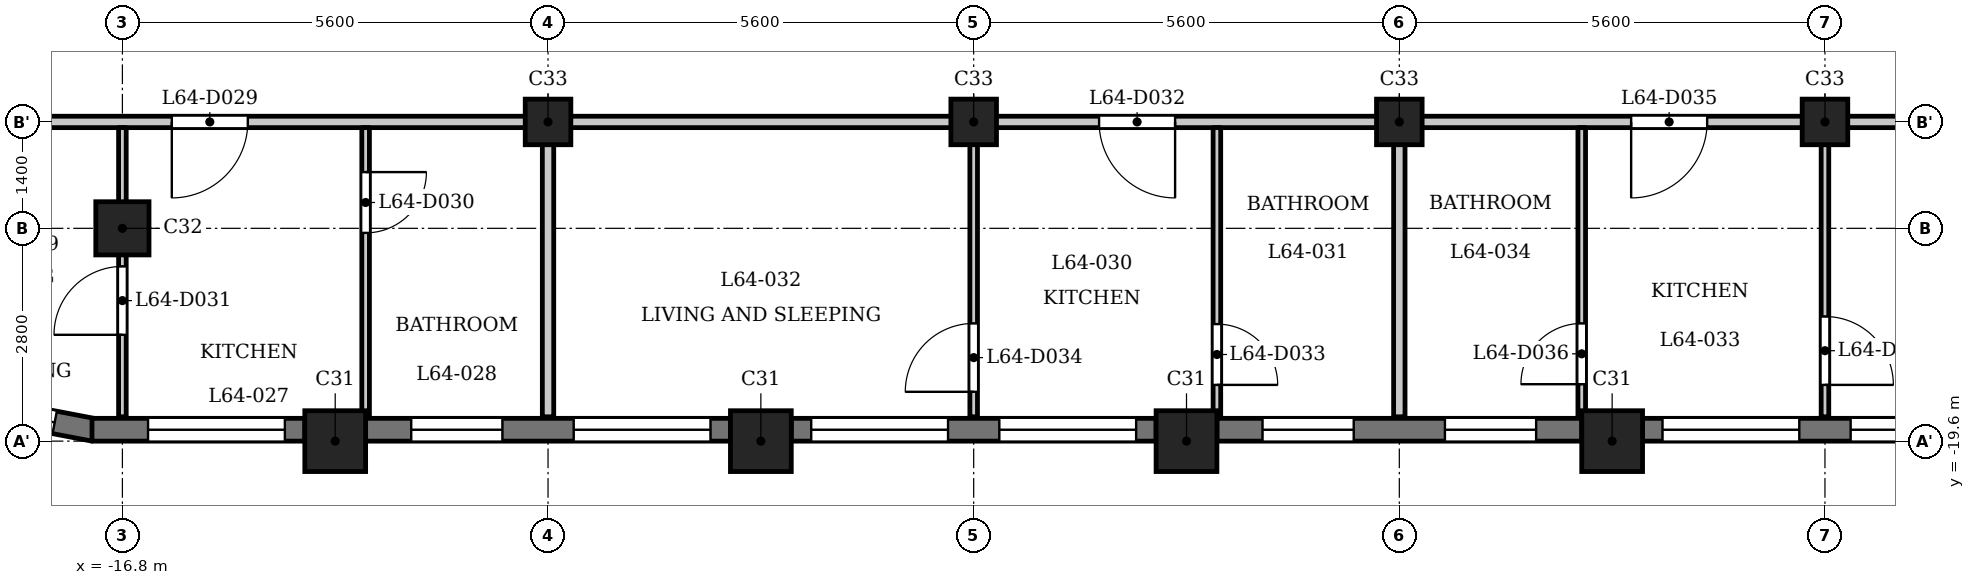
"""IFC4 building model, lengths in metres.
Left out: names, types, materials, properties, quantities, classifications, styles, units other than length and angle.
Written with IfcOpenShell. Run it as: python <this file> out.ifc"""

import sys

from ifc_helpers import new_model, si_unit, direction, frame, frame_2d, origin, origin_2d, place, context, subcontext, project, spatial, rectangle, extrude, element, fill, save


model = new_model("IFC4")
c1 = context("Model", 3, precision=1e-05, world=origin(), true_north=direction((0.0, 1.0)))
c2 = subcontext(c1, "Body", "Model", "MODEL_VIEW")
j1 = project(units=[si_unit("LENGTHUNIT", "METRE"), si_unit("PLANEANGLEUNIT", "RADIAN")], contexts=[c1])
p1 = place(None, origin())
s1 = spatial("IfcSite", under=j1, at=p1, CompositionType="ELEMENT")
p2 = place(p1, origin())
s2 = spatial("IfcBuilding", under=s1, at=p2, CompositionType="ELEMENT")
p3 = place(p2, frame((0.0, 0.0, 248.7)))
s3 = spatial("IfcBuildingStorey", under=s2, at=p3, CompositionType="ELEMENT", Elevation=248.7)
for number, where, z_axis, x_axis in (
    (1, (-14.0, -19.6, 0.0), (0.0, 0.0, 1.0), (1.0, 0.0, 0.0)),
    (2, (-8.4, -19.6, 0.0), (0.0, 0.0, 1.0), (1.0, 0.0, 0.0)),
    (3, (-2.8, -19.6, 0.0), (0.0, 0.0, 1.0), (1.0, 0.0, 0.0)),
    (4, (2.8, -19.6, 0.0), (0.0, 0.0, 1.0), (1.0, 0.0, 0.0)),
):
    element("IfcColumn", number, at=place(p3, frame(where, z_axis=z_axis, x_axis=x_axis)), inside=s3, PredefinedType="COLUMN", context=c2, shape_type="SweptSolid", body=[
        extrude(rectangle(XDim=0.8, YDim=0.8, at=origin_2d()), origin(), (0.0, 0.0, 1.0), 3.5),
    ])
p4 = place(p3, frame((-16.8, -16.8, 0.0), z_axis=(0.0, 0.0, 1.0), x_axis=(1.0, 0.0, 0.0)))
e5 = element("IfcColumn", 5, at=p4, inside=s3, PredefinedType="COLUMN", context=c2, shape_type="SweptSolid", body=[
    extrude(rectangle(XDim=0.7, YDim=0.7, at=origin_2d()), origin(), (0.0, 0.0, 1.0), 3.5),
])
for number, where, z_axis, x_axis in (
    (6, (-11.2, -15.4, 0.0), (0.0, 0.0, 1.0), (1.0, 0.0, 0.0)),
    (7, (-5.6, -15.4, 0.0), (0.0, 0.0, 1.0), (1.0, 0.0, 0.0)),
    (8, (0.0, -15.4, 0.0), (0.0, 0.0, 1.0), (1.0, 0.0, 0.0)),
    (9, (5.6, -15.4, 0.0), (0.0, 0.0, 1.0), (1.0, 0.0, 0.0)),
):
    element("IfcColumn", number, at=place(p3, frame(where, z_axis=z_axis, x_axis=x_axis)), inside=s3, PredefinedType="COLUMN", context=c2, shape_type="SweptSolid", body=[
        extrude(rectangle(XDim=0.6, YDim=0.6, at=origin_2d()), origin(), (0.0, 0.0, 1.0), 3.5),
    ])
p5 = place(p3, frame((-18.995, -19.105, 0.0), z_axis=(0.0, 0.0, 1.0), x_axis=(0.982301706131, -0.187305520826, 0.0)))
e10 = element("IfcWall", 10, at=p5, inside=s3, PredefinedType="SOLIDWALL", context=c2, shape_type="SweptSolid", body=[
    extrude(rectangle(XDim=1.856, YDim=0.3, at=frame_2d((0.928, 0.0))), origin(), (0.0, 0.0, 1.0), 2.55),
])
p6 = place(p5, frame((0.528, 0.0, 0.6)))
e11 = element("IfcOpeningElement", 11, at=p6, cuts=e10, PredefinedType="OPENING", context=c2, shape_type="SweptSolid", body=[
    extrude(rectangle(XDim=0.8, YDim=1.55, at=frame_2d((0.4, 0.775))), frame((0.0, 0.16, 0.0), z_axis=(0.0, -1.0, 0.0), x_axis=(1.0, 0.0, 0.0)), (0.0, 0.0, 1.0), 0.32),
])
p7 = place(p3, frame((-17.2, -19.45, 0.0), z_axis=(0.0, 0.0, 1.0), x_axis=(1.0, 0.0, 0.0)))
e12 = element("IfcWall", 12, at=p7, inside=s3, PredefinedType="SOLIDWALL", context=c2, shape_type="SweptSolid", body=[
    extrude(rectangle(XDim=2.8, YDim=0.3, at=frame_2d((1.4, 0.0))), origin(), (0.0, 0.0, 1.0), 2.55),
])
p8 = place(p7, frame((0.738, 0.0, 0.9)))
e13 = element("IfcOpeningElement", 13, at=p8, cuts=e12, PredefinedType="OPENING", context=c2, shape_type="SweptSolid", body=[
    extrude(rectangle(XDim=1.8, YDim=1.25, at=frame_2d((0.9, 0.625))), frame((0.0, 0.16, 0.0), z_axis=(0.0, -1.0, 0.0), x_axis=(1.0, 0.0, 0.0)), (0.0, 0.0, 1.0), 0.32),
])
p9 = place(p3, frame((-13.6, -19.45, 0.0), z_axis=(0.0, 0.0, 1.0), x_axis=(1.0, 0.0, 0.0)))
e14 = element("IfcWall", 14, at=p9, inside=s3, PredefinedType="SOLIDWALL", context=c2, shape_type="SweptSolid", body=[
    extrude(rectangle(XDim=4.8, YDim=0.3, at=frame_2d((2.4, 0.0))), origin(), (0.0, 0.0, 1.0), 2.55),
])
p10 = place(p9, frame((0.6, 0.0, 0.6)))
e15 = element("IfcOpeningElement", 15, at=p10, cuts=e14, PredefinedType="OPENING", context=c2, shape_type="SweptSolid", body=[
    extrude(rectangle(XDim=1.2, YDim=1.55, at=frame_2d((0.6, 0.775))), frame((0.0, 0.16, 0.0), z_axis=(0.0, -1.0, 0.0), x_axis=(1.0, 0.0, 0.0)), (0.0, 0.0, 1.0), 0.32),
])
p11 = place(p9, frame((2.738, 0.0, 0.9)))
e16 = element("IfcOpeningElement", 16, at=p11, cuts=e14, PredefinedType="OPENING", context=c2, shape_type="SweptSolid", body=[
    extrude(rectangle(XDim=1.8, YDim=1.25, at=frame_2d((0.9, 0.625))), frame((0.0, 0.16, 0.0), z_axis=(0.0, -1.0, 0.0), x_axis=(1.0, 0.0, 0.0)), (0.0, 0.0, 1.0), 0.32),
])
p12 = place(p3, frame((-8.0, -19.45, 0.0), z_axis=(0.0, 0.0, 1.0), x_axis=(1.0, 0.0, 0.0)))
e17 = element("IfcWall", 17, at=p12, inside=s3, PredefinedType="SOLIDWALL", context=c2, shape_type="SweptSolid", body=[
    extrude(rectangle(XDim=4.8, YDim=0.3, at=frame_2d((2.4, 0.0))), origin(), (0.0, 0.0, 1.0), 2.55),
])
p13 = place(p12, frame((0.262, 0.0, 0.9)))
e18 = element("IfcOpeningElement", 18, at=p13, cuts=e17, PredefinedType="OPENING", context=c2, shape_type="SweptSolid", body=[
    extrude(rectangle(XDim=1.8, YDim=1.25, at=frame_2d((0.9, 0.625))), frame((0.0, 0.16, 0.0), z_axis=(0.0, -1.0, 0.0), x_axis=(1.0, 0.0, 0.0)), (0.0, 0.0, 1.0), 0.32),
])
p14 = place(p12, frame((2.738, 0.0, 0.9)))
e19 = element("IfcOpeningElement", 19, at=p14, cuts=e17, PredefinedType="OPENING", context=c2, shape_type="SweptSolid", body=[
    extrude(rectangle(XDim=1.8, YDim=1.25, at=frame_2d((0.9, 0.625))), frame((0.0, 0.16, 0.0), z_axis=(0.0, -1.0, 0.0), x_axis=(1.0, 0.0, 0.0)), (0.0, 0.0, 1.0), 0.32),
])
p15 = place(p3, frame((-2.4, -19.45, 0.0), z_axis=(0.0, 0.0, 1.0), x_axis=(1.0, 0.0, 0.0)))
e20 = element("IfcWall", 20, at=p15, inside=s3, PredefinedType="SOLIDWALL", context=c2, shape_type="SweptSolid", body=[
    extrude(rectangle(XDim=4.8, YDim=0.3, at=frame_2d((2.4, 0.0))), origin(), (0.0, 0.0, 1.0), 2.55),
])
p16 = place(p15, frame((0.6, 0.0, 0.6)))
e21 = element("IfcOpeningElement", 21, at=p16, cuts=e20, PredefinedType="OPENING", context=c2, shape_type="SweptSolid", body=[
    extrude(rectangle(XDim=1.2, YDim=1.55, at=frame_2d((0.6, 0.775))), frame((0.0, 0.16, 0.0), z_axis=(0.0, -1.0, 0.0), x_axis=(1.0, 0.0, 0.0)), (0.0, 0.0, 1.0), 0.32),
])
p17 = place(p15, frame((3.0, 0.0, 0.6)))
e22 = element("IfcOpeningElement", 22, at=p17, cuts=e20, PredefinedType="OPENING", context=c2, shape_type="SweptSolid", body=[
    extrude(rectangle(XDim=1.2, YDim=1.55, at=frame_2d((0.6, 0.775))), frame((0.0, 0.16, 0.0), z_axis=(0.0, -1.0, 0.0), x_axis=(1.0, 0.0, 0.0)), (0.0, 0.0, 1.0), 0.32),
])
p18 = place(p3, frame((3.2, -19.45, 0.0), z_axis=(0.0, 0.0, 1.0), x_axis=(1.0, 0.0, 0.0)))
e23 = element("IfcWall", 23, at=p18, inside=s3, PredefinedType="SOLIDWALL", context=c2, shape_type="SweptSolid", body=[
    extrude(rectangle(XDim=4.8, YDim=0.3, at=frame_2d((2.4, 0.0))), origin(), (0.0, 0.0, 1.0), 2.55),
])
p19 = place(p18, frame((0.262, 0.0, 0.9)))
e24 = element("IfcOpeningElement", 24, at=p19, cuts=e23, PredefinedType="OPENING", context=c2, shape_type="SweptSolid", body=[
    extrude(rectangle(XDim=1.8, YDim=1.25, at=frame_2d((0.9, 0.625))), frame((0.0, 0.16, 0.0), z_axis=(0.0, -1.0, 0.0), x_axis=(1.0, 0.0, 0.0)), (0.0, 0.0, 1.0), 0.32),
])
p20 = place(p18, frame((2.738, 0.0, 0.9)))
e25 = element("IfcOpeningElement", 25, at=p20, cuts=e23, PredefinedType="OPENING", context=c2, shape_type="SweptSolid", body=[
    extrude(rectangle(XDim=1.8, YDim=1.25, at=frame_2d((0.9, 0.625))), frame((0.0, 0.16, 0.0), z_axis=(0.0, -1.0, 0.0), x_axis=(1.0, 0.0, 0.0)), (0.0, 0.0, 1.0), 0.32),
])
p21 = place(p3, frame((-23.322, -15.4, 0.0), z_axis=(0.0, 0.0, 1.0), x_axis=(1.0, 0.0, 0.0)))
e26 = element("IfcWall", 26, at=p21, inside=s3, PredefinedType="PARTITIONING", context=c2, shape_type="SweptSolid", body=[
    extrude(rectangle(XDim=46.872, YDim=0.15, at=frame_2d((23.436, 0.0))), origin(), (0.0, 0.0, 1.0), 3.2),
])
p22 = place(p21, frame((7.172, 0.0, 0.0)))
e27 = element("IfcOpeningElement", 27, at=p22, cuts=e26, PredefinedType="OPENING", context=c2, shape_type="SweptSolid", body=[
    extrude(rectangle(XDim=1.0, YDim=2.1, at=frame_2d((0.5, 1.05))), frame((0.0, 0.085, 0.0), z_axis=(0.0, -1.0, 0.0), x_axis=(1.0, 0.0, 0.0)), (0.0, 0.0, 1.0), 0.17),
])
p23 = place(p21, frame((19.372, 0.0, 0.0)))
e28 = element("IfcOpeningElement", 28, at=p23, cuts=e26, PredefinedType="OPENING", context=c2, shape_type="SweptSolid", body=[
    extrude(rectangle(XDim=1.0, YDim=2.1, at=frame_2d((0.5, 1.05))), frame((0.0, 0.085, 0.0), z_axis=(0.0, -1.0, 0.0), x_axis=(1.0, 0.0, 0.0)), (0.0, 0.0, 1.0), 0.17),
])
p24 = place(p21, frame((26.372, 0.0, 0.0)))
e29 = element("IfcOpeningElement", 29, at=p24, cuts=e26, PredefinedType="OPENING", context=c2, shape_type="SweptSolid", body=[
    extrude(rectangle(XDim=1.0, YDim=2.1, at=frame_2d((0.5, 1.05))), frame((0.0, 0.085, 0.0), z_axis=(0.0, -1.0, 0.0), x_axis=(1.0, 0.0, 0.0)), (0.0, 0.0, 1.0), 0.17),
])
p25 = place(p21, frame((38.572, 0.0, 0.0)))
e30 = element("IfcOpeningElement", 30, at=p25, cuts=e26, PredefinedType="OPENING", context=c2, shape_type="SweptSolid", body=[
    extrude(rectangle(XDim=1.0, YDim=2.1, at=frame_2d((0.5, 1.05))), frame((0.0, 0.085, 0.0), z_axis=(0.0, -1.0, 0.0), x_axis=(1.0, 0.0, 0.0)), (0.0, 0.0, 1.0), 0.17),
])
p26 = place(p3, frame((-16.8, -19.28, 0.0), z_axis=(0.0, 0.0, 1.0), x_axis=(0.0, 1.0, 0.0)))
e31 = element("IfcWall", 31, at=p26, inside=s3, PredefinedType="PARTITIONING", context=c2, shape_type="SweptSolid", body=[
    extrude(rectangle(XDim=3.805, YDim=0.1, at=frame_2d((1.902, 0.0))), origin(), (0.0, 0.0, 1.0), 3.2),
])
p27 = place(p26, frame((1.079, 0.0, 0.0)))
e32 = element("IfcOpeningElement", 32, at=p27, cuts=e31, PredefinedType="OPENING", context=c2, shape_type="SweptSolid", body=[
    extrude(rectangle(XDim=0.9, YDim=2.1, at=frame_2d((0.45, 1.05))), frame((0.0, 0.06, 0.0), z_axis=(0.0, -1.0, 0.0), x_axis=(1.0, 0.0, 0.0)), (0.0, 0.0, 1.0), 0.12),
])
p28 = place(p3, frame((-13.6, -19.28, 0.0), z_axis=(0.0, 0.0, 1.0), x_axis=(0.0, 1.0, 0.0)))
e33 = element("IfcWall", 33, at=p28, inside=s3, PredefinedType="PARTITIONING", context=c2, shape_type="SweptSolid", body=[
    extrude(rectangle(XDim=3.805, YDim=0.1, at=frame_2d((1.902, 0.0))), origin(), (0.0, 0.0, 1.0), 3.2),
])
p29 = place(p28, frame((2.42, 0.0, 0.0)))
e34 = element("IfcOpeningElement", 34, at=p29, cuts=e33, PredefinedType="OPENING", context=c2, shape_type="SweptSolid", body=[
    extrude(rectangle(XDim=0.8, YDim=2.1, at=frame_2d((0.4, 1.05))), frame((0.0, 0.06, 0.0), z_axis=(0.0, -1.0, 0.0), x_axis=(1.0, 0.0, 0.0)), (0.0, 0.0, 1.0), 0.12),
])
p30 = place(p3, frame((-11.2, -19.28, 0.0), z_axis=(0.0, 0.0, 1.0), x_axis=(0.0, 1.0, 0.0)))
e35 = element("IfcWall", 35, at=p30, inside=s3, PredefinedType="PARTITIONING", context=c2, shape_type="SweptSolid", body=[
    extrude(rectangle(XDim=3.805, YDim=0.15, at=frame_2d((1.902, 0.0))), origin(), (0.0, 0.0, 1.0), 3.2),
])
p31 = place(p3, frame((-5.6, -19.28, 0.0), z_axis=(0.0, 0.0, 1.0), x_axis=(0.0, 1.0, 0.0)))
e36 = element("IfcWall", 36, at=p31, inside=s3, PredefinedType="PARTITIONING", context=c2, shape_type="SweptSolid", body=[
    extrude(rectangle(XDim=3.805, YDim=0.1, at=frame_2d((1.902, 0.0))), origin(), (0.0, 0.0, 1.0), 3.2),
])
p32 = place(p31, frame((0.329, 0.0, 0.0)))
e37 = element("IfcOpeningElement", 37, at=p32, cuts=e36, PredefinedType="OPENING", context=c2, shape_type="SweptSolid", body=[
    extrude(rectangle(XDim=0.9, YDim=2.1, at=frame_2d((0.45, 1.05))), frame((0.0, 0.06, 0.0), z_axis=(0.0, -1.0, 0.0), x_axis=(1.0, 0.0, 0.0)), (0.0, 0.0, 1.0), 0.12),
])
p33 = place(p3, frame((-2.4, -19.28, 0.0), z_axis=(0.0, 0.0, 1.0), x_axis=(0.0, 1.0, 0.0)))
e38 = element("IfcWall", 38, at=p33, inside=s3, PredefinedType="PARTITIONING", context=c2, shape_type="SweptSolid", body=[
    extrude(rectangle(XDim=3.805, YDim=0.1, at=frame_2d((1.902, 0.0))), origin(), (0.0, 0.0, 1.0), 3.2),
])
p34 = place(p33, frame((0.42, 0.0, 0.0)))
e39 = element("IfcOpeningElement", 39, at=p34, cuts=e38, PredefinedType="OPENING", context=c2, shape_type="SweptSolid", body=[
    extrude(rectangle(XDim=0.8, YDim=2.1, at=frame_2d((0.4, 1.05))), frame((0.0, 0.06, 0.0), z_axis=(0.0, -1.0, 0.0), x_axis=(1.0, 0.0, 0.0)), (0.0, 0.0, 1.0), 0.12),
])
p35 = place(p3, frame((0.0, -19.28, 0.0), z_axis=(0.0, 0.0, 1.0), x_axis=(0.0, 1.0, 0.0)))
e40 = element("IfcWall", 40, at=p35, inside=s3, PredefinedType="PARTITIONING", context=c2, shape_type="SweptSolid", body=[
    extrude(rectangle(XDim=3.805, YDim=0.15, at=frame_2d((1.902, 0.0))), origin(), (0.0, 0.0, 1.0), 3.2),
])
p36 = place(p3, frame((2.4, -19.28, 0.0), z_axis=(0.0, 0.0, 1.0), x_axis=(0.0, 1.0, 0.0)))
e41 = element("IfcWall", 41, at=p36, inside=s3, PredefinedType="PARTITIONING", context=c2, shape_type="SweptSolid", body=[
    extrude(rectangle(XDim=3.805, YDim=0.1, at=frame_2d((1.902, 0.0))), origin(), (0.0, 0.0, 1.0), 3.2),
])
p37 = place(p36, frame((0.429, 0.0, 0.0)))
e42 = element("IfcOpeningElement", 42, at=p37, cuts=e41, PredefinedType="OPENING", context=c2, shape_type="SweptSolid", body=[
    extrude(rectangle(XDim=0.8, YDim=2.1, at=frame_2d((0.4, 1.05))), frame((0.0, 0.06, 0.0), z_axis=(0.0, -1.0, 0.0), x_axis=(1.0, 0.0, 0.0)), (0.0, 0.0, 1.0), 0.12),
])
p38 = place(p3, frame((5.6, -19.28, 0.0), z_axis=(0.0, 0.0, 1.0), x_axis=(0.0, 1.0, 0.0)))
e43 = element("IfcWall", 43, at=p38, inside=s3, PredefinedType="PARTITIONING", context=c2, shape_type="SweptSolid", body=[
    extrude(rectangle(XDim=3.805, YDim=0.1, at=frame_2d((1.902, 0.0))), origin(), (0.0, 0.0, 1.0), 3.2),
])
p39 = place(p38, frame((0.42, 0.0, 0.0)))
e44 = element("IfcOpeningElement", 44, at=p39, cuts=e43, PredefinedType="OPENING", context=c2, shape_type="SweptSolid", body=[
    extrude(rectangle(XDim=0.9, YDim=2.1, at=frame_2d((0.45, 1.05))), frame((0.0, 0.06, 0.0), z_axis=(0.0, -1.0, 0.0), x_axis=(1.0, 0.0, 0.0)), (0.0, 0.0, 1.0), 0.12),
])
p40 = place(p22, origin())
e45 = element("IfcDoor", 45, at=p40, inside=s3, OperationType="SINGLE_SWING_LEFT", PredefinedType="DOOR", context=c2, shape_type="SweptSolid", body=[
    extrude(rectangle(XDim=1.0, YDim=2.1, at=frame_2d((0.5, 1.05))), frame((0.0, 0.025, 0.0), z_axis=(0.0, -1.0, 0.0), x_axis=(1.0, 0.0, 0.0)), (0.0, 0.0, 1.0), 0.05),
])
fill(e27, e45)
p41 = place(p29, origin())
e46 = element("IfcDoor", 46, at=p41, inside=s3, OperationType="SINGLE_SWING_RIGHT", PredefinedType="DOOR", context=c2, shape_type="SweptSolid", body=[
    extrude(rectangle(XDim=0.8, YDim=2.1, at=frame_2d((0.4, 1.05))), frame((0.0, 0.025, 0.0), z_axis=(0.0, -1.0, 0.0), x_axis=(1.0, 0.0, 0.0)), (0.0, 0.0, 1.0), 0.05),
])
fill(e34, e46)
p42 = place(p27, origin())
e47 = element("IfcDoor", 47, at=p42, inside=s3, OperationType="SINGLE_SWING_RIGHT", PredefinedType="DOOR", context=c2, shape_type="SweptSolid", body=[
    extrude(rectangle(XDim=0.9, YDim=2.1, at=frame_2d((0.45, 1.05))), frame((0.0, 0.025, 0.0), z_axis=(0.0, -1.0, 0.0), x_axis=(1.0, 0.0, 0.0)), (0.0, 0.0, 1.0), 0.05),
])
fill(e32, e47)
p43 = place(p23, origin())
e48 = element("IfcDoor", 48, at=p43, inside=s3, OperationType="SINGLE_SWING_RIGHT", PredefinedType="DOOR", context=c2, shape_type="SweptSolid", body=[
    extrude(rectangle(XDim=1.0, YDim=2.1, at=frame_2d((0.5, 1.05))), frame((0.0, 0.025, 0.0), z_axis=(0.0, -1.0, 0.0), x_axis=(1.0, 0.0, 0.0)), (0.0, 0.0, 1.0), 0.05),
])
fill(e28, e48)
p44 = place(p34, origin())
e49 = element("IfcDoor", 49, at=p44, inside=s3, OperationType="SINGLE_SWING_LEFT", PredefinedType="DOOR", context=c2, shape_type="SweptSolid", body=[
    extrude(rectangle(XDim=0.8, YDim=2.1, at=frame_2d((0.4, 1.05))), frame((0.0, 0.025, 0.0), z_axis=(0.0, -1.0, 0.0), x_axis=(1.0, 0.0, 0.0)), (0.0, 0.0, 1.0), 0.05),
])
fill(e39, e49)
p45 = place(p32, origin())
e50 = element("IfcDoor", 50, at=p45, inside=s3, OperationType="SINGLE_SWING_RIGHT", PredefinedType="DOOR", context=c2, shape_type="SweptSolid", body=[
    extrude(rectangle(XDim=0.9, YDim=2.1, at=frame_2d((0.45, 1.05))), frame((0.0, 0.025, 0.0), z_axis=(0.0, -1.0, 0.0), x_axis=(1.0, 0.0, 0.0)), (0.0, 0.0, 1.0), 0.05),
])
fill(e37, e50)
p46 = place(p24, origin())
e51 = element("IfcDoor", 51, at=p46, inside=s3, OperationType="SINGLE_SWING_LEFT", PredefinedType="DOOR", context=c2, shape_type="SweptSolid", body=[
    extrude(rectangle(XDim=1.0, YDim=2.1, at=frame_2d((0.5, 1.05))), frame((0.0, 0.025, 0.0), z_axis=(0.0, -1.0, 0.0), x_axis=(1.0, 0.0, 0.0)), (0.0, 0.0, 1.0), 0.05),
])
fill(e29, e51)
p47 = place(p37, origin())
e52 = element("IfcDoor", 52, at=p47, inside=s3, OperationType="SINGLE_SWING_RIGHT", PredefinedType="DOOR", context=c2, shape_type="SweptSolid", body=[
    extrude(rectangle(XDim=0.8, YDim=2.1, at=frame_2d((0.4, 1.05))), frame((0.0, 0.025, 0.0), z_axis=(0.0, -1.0, 0.0), x_axis=(1.0, 0.0, 0.0)), (0.0, 0.0, 1.0), 0.05),
])
fill(e42, e52)
p48 = place(p39, origin())
e53 = element("IfcDoor", 53, at=p48, inside=s3, OperationType="SINGLE_SWING_LEFT", PredefinedType="DOOR", context=c2, shape_type="SweptSolid", body=[
    extrude(rectangle(XDim=0.9, YDim=2.1, at=frame_2d((0.45, 1.05))), frame((0.0, 0.025, 0.0), z_axis=(0.0, -1.0, 0.0), x_axis=(1.0, 0.0, 0.0)), (0.0, 0.0, 1.0), 0.05),
])
fill(e44, e53)
p49 = place(p6, origin())
e54 = element("IfcWindow", 54, at=p49, inside=s3, PartitioningType="SINGLE_PANEL", PredefinedType="WINDOW", context=c2, shape_type="SweptSolid", body=[
    extrude(rectangle(XDim=0.8, YDim=1.55, at=frame_2d((0.4, 0.775))), frame((0.0, 0.03, 0.0), z_axis=(0.0, -1.0, 0.0), x_axis=(1.0, 0.0, 0.0)), (0.0, 0.0, 1.0), 0.06),
])
fill(e11, e54)
p50 = place(p8, origin())
e55 = element("IfcWindow", 55, at=p50, inside=s3, PartitioningType="SINGLE_PANEL", PredefinedType="WINDOW", context=c2, shape_type="SweptSolid", body=[
    extrude(rectangle(XDim=1.8, YDim=1.25, at=frame_2d((0.9, 0.625))), frame((0.0, 0.03, 0.0), z_axis=(0.0, -1.0, 0.0), x_axis=(1.0, 0.0, 0.0)), (0.0, 0.0, 1.0), 0.06),
])
fill(e13, e55)
p51 = place(p10, origin())
e56 = element("IfcWindow", 56, at=p51, inside=s3, PartitioningType="SINGLE_PANEL", PredefinedType="WINDOW", context=c2, shape_type="SweptSolid", body=[
    extrude(rectangle(XDim=1.2, YDim=1.55, at=frame_2d((0.6, 0.775))), frame((0.0, 0.03, 0.0), z_axis=(0.0, -1.0, 0.0), x_axis=(1.0, 0.0, 0.0)), (0.0, 0.0, 1.0), 0.06),
])
fill(e15, e56)
p52 = place(p11, origin())
e57 = element("IfcWindow", 57, at=p52, inside=s3, PartitioningType="SINGLE_PANEL", PredefinedType="WINDOW", context=c2, shape_type="SweptSolid", body=[
    extrude(rectangle(XDim=1.8, YDim=1.25, at=frame_2d((0.9, 0.625))), frame((0.0, 0.03, 0.0), z_axis=(0.0, -1.0, 0.0), x_axis=(1.0, 0.0, 0.0)), (0.0, 0.0, 1.0), 0.06),
])
fill(e16, e57)
p53 = place(p13, origin())
e58 = element("IfcWindow", 58, at=p53, inside=s3, PartitioningType="SINGLE_PANEL", PredefinedType="WINDOW", context=c2, shape_type="SweptSolid", body=[
    extrude(rectangle(XDim=1.8, YDim=1.25, at=frame_2d((0.9, 0.625))), frame((0.0, 0.03, 0.0), z_axis=(0.0, -1.0, 0.0), x_axis=(1.0, 0.0, 0.0)), (0.0, 0.0, 1.0), 0.06),
])
fill(e18, e58)
p54 = place(p14, origin())
e59 = element("IfcWindow", 59, at=p54, inside=s3, PartitioningType="SINGLE_PANEL", PredefinedType="WINDOW", context=c2, shape_type="SweptSolid", body=[
    extrude(rectangle(XDim=1.8, YDim=1.25, at=frame_2d((0.9, 0.625))), frame((0.0, 0.03, 0.0), z_axis=(0.0, -1.0, 0.0), x_axis=(1.0, 0.0, 0.0)), (0.0, 0.0, 1.0), 0.06),
])
fill(e19, e59)
p55 = place(p16, origin())
e60 = element("IfcWindow", 60, at=p55, inside=s3, PartitioningType="SINGLE_PANEL", PredefinedType="WINDOW", context=c2, shape_type="SweptSolid", body=[
    extrude(rectangle(XDim=1.2, YDim=1.55, at=frame_2d((0.6, 0.775))), frame((0.0, 0.03, 0.0), z_axis=(0.0, -1.0, 0.0), x_axis=(1.0, 0.0, 0.0)), (0.0, 0.0, 1.0), 0.06),
])
fill(e21, e60)
p56 = place(p17, origin())
e61 = element("IfcWindow", 61, at=p56, inside=s3, PartitioningType="SINGLE_PANEL", PredefinedType="WINDOW", context=c2, shape_type="SweptSolid", body=[
    extrude(rectangle(XDim=1.2, YDim=1.55, at=frame_2d((0.6, 0.775))), frame((0.0, 0.03, 0.0), z_axis=(0.0, -1.0, 0.0), x_axis=(1.0, 0.0, 0.0)), (0.0, 0.0, 1.0), 0.06),
])
fill(e22, e61)
p57 = place(p19, origin())
e62 = element("IfcWindow", 62, at=p57, inside=s3, PartitioningType="SINGLE_PANEL", PredefinedType="WINDOW", context=c2, shape_type="SweptSolid", body=[
    extrude(rectangle(XDim=1.8, YDim=1.25, at=frame_2d((0.9, 0.625))), frame((0.0, 0.03, 0.0), z_axis=(0.0, -1.0, 0.0), x_axis=(1.0, 0.0, 0.0)), (0.0, 0.0, 1.0), 0.06),
])
fill(e24, e62)
p58 = place(p20, origin())
e63 = element("IfcWindow", 63, at=p58, inside=s3, PartitioningType="SINGLE_PANEL", PredefinedType="WINDOW", context=c2, shape_type="SweptSolid", body=[
    extrude(rectangle(XDim=1.8, YDim=1.25, at=frame_2d((0.9, 0.625))), frame((0.0, 0.03, 0.0), z_axis=(0.0, -1.0, 0.0), x_axis=(1.0, 0.0, 0.0)), (0.0, 0.0, 1.0), 0.06),
])
fill(e25, e63)
save(model, sys.argv[1])
